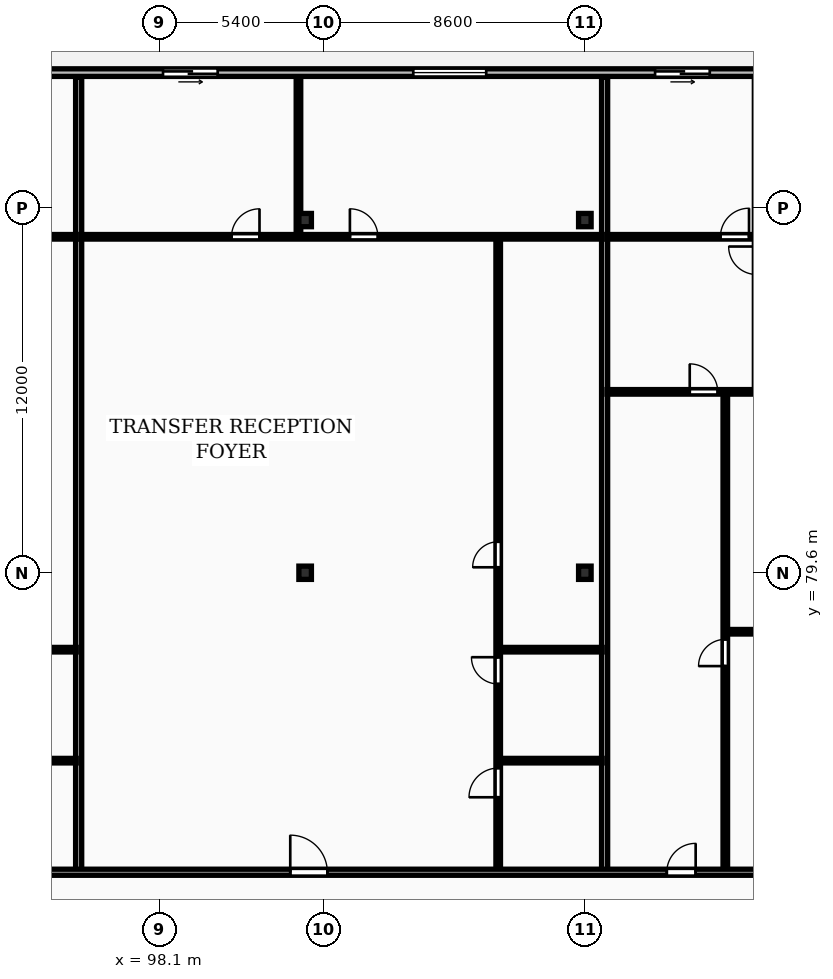
"""IFC4 building model, lengths in metres.
Left out: names, types, materials, properties, quantities, classifications, styles, units other than length and angle.
Written with IfcOpenShell. Run it as: python <this file> out.ifc"""

import sys

from ifc_helpers import new_model, si_unit, direction, frame, frame_2d, origin, origin_2d, place, context, subcontext, project, spatial, rectangle, i_section, extrude, element, fill, save


model = new_model("IFC4")
c1 = context("Model", 3, precision=1e-05, world=origin(), true_north=direction((0.0, 1.0)))
c2 = subcontext(c1, "Body", "Model", "MODEL_VIEW")
j1 = project(units=[si_unit("LENGTHUNIT", "METRE"), si_unit("PLANEANGLEUNIT", "RADIAN")], contexts=[c1])
p1 = place(None, origin())
s1 = spatial("IfcSite", under=j1, at=p1, CompositionType="ELEMENT")
p2 = place(p1, origin())
s2 = spatial("IfcBuilding", under=s1, at=p2, CompositionType="ELEMENT")
p3 = place(p2, frame((0.0, 0.0, 153.7)))
s3 = spatial("IfcBuildingStorey", under=s2, at=p3, CompositionType="ELEMENT", Elevation=153.7)
for number, where, z_axis, x_axis in (
    (1, (102.9, 79.6, 0.0), (0.0, 0.0, 1.0), (1.0, 0.0, 0.0)),
    (2, (102.9, 91.2, 0.0), (0.0, 0.0, 1.0), (1.0, 0.0, 0.0)),
    (3, (112.1, 79.6, 0.0), (0.0, 0.0, 1.0), (1.0, 0.0, 0.0)),
    (4, (112.1, 91.2, 0.0), (0.0, 0.0, 1.0), (1.0, 0.0, 0.0)),
):
    element("IfcColumn", number, at=place(p3, frame(where, z_axis=z_axis, x_axis=x_axis)), inside=s3, PredefinedType="COLUMN", context=c2, shape_type="SweptSolid", body=[
        extrude(i_section(OverallWidth=0.412, OverallDepth=0.437, WebThickness=0.036, FlangeThickness=0.052, FilletRadius=0.015, at=origin_2d()), origin(), (0.0, 0.0, 1.0), 3.6),
    ])
p4 = place(p3, frame((130.6, 96.05, 0.0), z_axis=(0.0, 0.0, 1.0), x_axis=(-1.0, 0.0, 0.0)))
e5 = element("IfcWall", 5, at=p4, inside=s3, PredefinedType="STANDARD", context=c2, shape_type="SweptSolid", body=[
    extrude(rectangle(XDim=73.0, YDim=0.25, at=frame_2d((36.5, 0.0))), origin(), (0.0, 0.0, 1.0), 3.32),
])
p5 = place(p4, frame((68.197, 0.0, 0.0)))
e6 = element("IfcOpeningElement", 6, at=p5, cuts=e5, PredefinedType="OPENING", context=c2, shape_type="SweptSolid", body=[
    extrude(rectangle(XDim=1.8, YDim=2.2, at=frame_2d((0.9, 1.1))), frame((0.0, 0.135, 0.0), z_axis=(0.0, -1.0, 0.0), x_axis=(1.0, 0.0, 0.0)), (0.0, 0.0, 1.0), 0.27),
])
p6 = place(p4, frame((58.911, 0.0, 0.85)))
e7 = element("IfcOpeningElement", 7, at=p6, cuts=e5, PredefinedType="OPENING", context=c2, shape_type="SweptSolid", body=[
    extrude(rectangle(XDim=2.4, YDim=1.9, at=frame_2d((1.2, 0.95))), frame((0.0, 0.135, 0.0), z_axis=(0.0, -1.0, 0.0), x_axis=(1.0, 0.0, 0.0)), (0.0, 0.0, 1.0), 0.27),
])
p7 = place(p4, frame((49.571, 0.0, 0.0)))
e8 = element("IfcOpeningElement", 8, at=p7, cuts=e5, PredefinedType="OPENING", context=c2, shape_type="SweptSolid", body=[
    extrude(rectangle(XDim=1.8, YDim=2.2, at=frame_2d((0.9, 1.1))), frame((0.0, 0.135, 0.0), z_axis=(0.0, -1.0, 0.0), x_axis=(1.0, 0.0, 0.0)), (0.0, 0.0, 1.0), 0.27),
])
p8 = place(p4, frame((39.572, 0.0, 0.85)))
e9 = element("IfcOpeningElement", 9, at=p8, cuts=e5, PredefinedType="OPENING", context=c2, shape_type="SweptSolid", body=[
    extrude(rectangle(XDim=2.4, YDim=1.9, at=frame_2d((1.2, 0.95))), frame((0.0, 0.135, 0.0), z_axis=(0.0, -1.0, 0.0), x_axis=(1.0, 0.0, 0.0)), (0.0, 0.0, 1.0), 0.27),
])
p9 = place(p4, frame((30.575, 0.0, 0.0)))
e10 = element("IfcOpeningElement", 10, at=p9, cuts=e5, PredefinedType="OPENING", context=c2, shape_type="SweptSolid", body=[
    extrude(rectangle(XDim=1.8, YDim=2.2, at=frame_2d((0.9, 1.1))), frame((0.0, 0.135, 0.0), z_axis=(0.0, -1.0, 0.0), x_axis=(1.0, 0.0, 0.0)), (0.0, 0.0, 1.0), 0.27),
])
p10 = place(p4, frame((21.745, 0.0, 0.85)))
e11 = element("IfcOpeningElement", 11, at=p10, cuts=e5, PredefinedType="OPENING", context=c2, shape_type="SweptSolid", body=[
    extrude(rectangle(XDim=2.4, YDim=1.9, at=frame_2d((1.2, 0.95))), frame((0.0, 0.135, 0.0), z_axis=(0.0, -1.0, 0.0), x_axis=(1.0, 0.0, 0.0)), (0.0, 0.0, 1.0), 0.27),
])
p11 = place(p4, frame((9.435, 0.0, 0.85)))
e12 = element("IfcOpeningElement", 12, at=p11, cuts=e5, PredefinedType="OPENING", context=c2, shape_type="SweptSolid", body=[
    extrude(rectangle(XDim=2.4, YDim=1.9, at=frame_2d((1.2, 0.95))), frame((0.0, 0.135, 0.0), z_axis=(0.0, -1.0, 0.0), x_axis=(1.0, 0.0, 0.0)), (0.0, 0.0, 1.0), 0.27),
])
p12 = place(p4, frame((5.695, 0.0, 0.85)))
e13 = element("IfcOpeningElement", 13, at=p12, cuts=e5, PredefinedType="OPENING", context=c2, shape_type="SweptSolid", body=[
    extrude(rectangle(XDim=1.8, YDim=1.8, at=frame_2d((0.9, 0.9))), frame((0.0, 0.135, 0.0), z_axis=(0.0, -1.0, 0.0), x_axis=(1.0, 0.0, 0.0)), (0.0, 0.0, 1.0), 0.27),
])
p13 = place(p4, frame((14.39, 0.0, 0.0)))
e14 = element("IfcOpeningElement", 14, at=p13, cuts=e5, PredefinedType="OPENING", context=c2, shape_type="SweptSolid", body=[
    extrude(rectangle(XDim=1.8, YDim=2.2, at=frame_2d((0.9, 1.1))), frame((0.0, 0.135, 0.0), z_axis=(0.0, -1.0, 0.0), x_axis=(1.0, 0.0, 0.0)), (0.0, 0.0, 1.0), 0.27),
])
p14 = place(p4, frame((1.245, 0.0, 0.85)))
e15 = element("IfcOpeningElement", 15, at=p14, cuts=e5, PredefinedType="OPENING", context=c2, shape_type="SweptSolid", body=[
    extrude(rectangle(XDim=2.4, YDim=1.9, at=frame_2d((1.2, 0.95))), frame((0.0, 0.135, 0.0), z_axis=(0.0, -1.0, 0.0), x_axis=(1.0, 0.0, 0.0)), (0.0, 0.0, 1.0), 0.27),
])
p15 = place(p3, frame((95.45, 69.83, 0.0), z_axis=(0.0, 0.0, 1.0), x_axis=(0.0, 1.0, 0.0)))
e16 = element("IfcWall", 16, at=p15, inside=s3, PredefinedType="PARTITIONING", context=c2, shape_type="SweptSolid", body=[
    extrude(rectangle(XDim=26.07, YDim=0.2, at=frame_2d((13.035, 0.0))), origin(), (0.0, 0.0, 1.0), 3.32),
])
for number, where, z_axis, x_axis in (
    (17, (92.24, 73.42, 0.0), (0.0, 0.0, 1.0), (1.0, 0.0, 0.0)),
    (18, (92.24, 77.07, 0.0), (0.0, 0.0, 1.0), (1.0, 0.0, 0.0)),
):
    element("IfcWall", number, at=place(p3, frame(where, z_axis=z_axis, x_axis=x_axis)), inside=s3, PredefinedType="PARTITIONING", context=c2, shape_type="SweptSolid", body=[
        extrude(rectangle(XDim=3.13, YDim=0.15, at=frame_2d((1.565, 0.0))), origin(), (0.0, 0.0, 1.0), 3.32),
    ])
p16 = place(p3, frame((75.893, 90.65, 0.0), z_axis=(0.0, 0.0, 1.0), x_axis=(1.0, 0.0, 0.0)))
e19 = element("IfcWall", 19, at=p16, inside=s3, PredefinedType="PARTITIONING", context=c2, shape_type="SweptSolid", body=[
    extrude(rectangle(XDim=19.478, YDim=0.15, at=frame_2d((9.739, 0.0))), origin(), (0.0, 0.0, 1.0), 3.32),
])
p17 = place(p16, frame((6.265, 0.0, 0.0)))
e20 = element("IfcOpeningElement", 20, at=p17, cuts=e19, PredefinedType="OPENING", context=c2, shape_type="SweptSolid", body=[
    extrude(rectangle(XDim=0.94, YDim=2.1, at=frame_2d((0.47, 1.05))), frame((0.0, 0.085, 0.0), z_axis=(0.0, -1.0, 0.0), x_axis=(1.0, 0.0, 0.0)), (0.0, 0.0, 1.0), 0.17),
])
p18 = place(p16, frame((10.095, 0.0, 0.0)))
e21 = element("IfcOpeningElement", 21, at=p18, cuts=e19, PredefinedType="OPENING", context=c2, shape_type="SweptSolid", body=[
    extrude(rectangle(XDim=0.94, YDim=2.1, at=frame_2d((0.47, 1.05))), frame((0.0, 0.085, 0.0), z_axis=(0.0, -1.0, 0.0), x_axis=(1.0, 0.0, 0.0)), (0.0, 0.0, 1.0), 0.17),
])
p19 = place(p3, frame((112.75, 69.83, 0.0), z_axis=(0.0, 0.0, 1.0), x_axis=(0.0, 1.0, 0.0)))
e22 = element("IfcWall", 22, at=p19, inside=s3, PredefinedType="PARTITIONING", context=c2, shape_type="SweptSolid", body=[
    extrude(rectangle(XDim=26.07, YDim=0.2, at=frame_2d((13.035, 0.0))), origin(), (0.0, 0.0, 1.0), 3.32),
])
for number, where, z_axis, x_axis in (
    (23, (109.31, 73.42, 0.0), (0.0, 0.0, 1.0), (1.0, 0.0, 0.0)),
    (24, (109.31, 77.07, 0.0), (0.0, 0.0, 1.0), (1.0, 0.0, 0.0)),
):
    element("IfcWall", number, at=place(p3, frame(where, z_axis=z_axis, x_axis=x_axis)), inside=s3, PredefinedType="PARTITIONING", context=c2, shape_type="SweptSolid", body=[
        extrude(rectangle(XDim=3.36, YDim=0.15, at=frame_2d((1.68, 0.0))), origin(), (0.0, 0.0, 1.0), 3.32),
    ])
p20 = place(p3, frame((109.25, 69.81, 0.0), z_axis=(0.0, 0.0, 1.0), x_axis=(0.0, 1.0, 0.0)))
e25 = element("IfcWall", 25, at=p20, inside=s3, PredefinedType="PARTITIONING", context=c2, shape_type="SweptSolid", body=[
    extrude(rectangle(XDim=20.78, YDim=0.15, at=frame_2d((10.39, 0.0))), origin(), (0.0, 0.0, 1.0), 3.32),
])
p21 = place(p20, frame((2.406, 0.0, 0.0)))
e26 = element("IfcOpeningElement", 26, at=p21, cuts=e25, PredefinedType="OPENING", context=c2, shape_type="SweptSolid", body=[
    extrude(rectangle(XDim=0.96, YDim=2.1, at=frame_2d((0.48, 1.05))), frame((0.0, 0.085, 0.0), z_axis=(0.0, -1.0, 0.0), x_axis=(1.0, 0.0, 0.0)), (0.0, 0.0, 1.0), 0.17),
])
p22 = place(p20, frame((6.133, 0.0, 0.0)))
e27 = element("IfcOpeningElement", 27, at=p22, cuts=e25, PredefinedType="OPENING", context=c2, shape_type="SweptSolid", body=[
    extrude(rectangle(XDim=0.88, YDim=2.06, at=frame_2d((0.44, 1.03))), frame((0.0, 0.085, 0.0), z_axis=(0.0, -1.0, 0.0), x_axis=(1.0, 0.0, 0.0)), (0.0, 0.0, 1.0), 0.17),
])
p23 = place(p20, frame((9.97, 0.0, 0.0)))
e28 = element("IfcOpeningElement", 28, at=p23, cuts=e25, PredefinedType="OPENING", context=c2, shape_type="SweptSolid", body=[
    extrude(rectangle(XDim=0.84, YDim=2.04, at=frame_2d((0.42, 1.02))), frame((0.0, 0.085, 0.0), z_axis=(0.0, -1.0, 0.0), x_axis=(1.0, 0.0, 0.0)), (0.0, 0.0, 1.0), 0.17),
])
p24 = place(p3, frame((102.68, 90.73, 0.0), z_axis=(0.0, 0.0, 1.0), x_axis=(0.0, 1.0, 0.0)))
e29 = element("IfcWall", 29, at=p24, inside=s3, PredefinedType="PARTITIONING", context=c2, shape_type="SweptSolid", body=[
    extrude(rectangle(XDim=5.17, YDim=0.15, at=frame_2d((2.585, 0.0))), origin(), (0.0, 0.0, 1.0), 2.627),
])
p25 = place(p3, frame((95.53, 90.65, 0.0), z_axis=(0.0, 0.0, 1.0), x_axis=(1.0, 0.0, 0.0)))
e30 = element("IfcWall", 30, at=p25, inside=s3, PredefinedType="PARTITIONING", context=c2, shape_type="SweptSolid", body=[
    extrude(rectangle(XDim=17.14, YDim=0.15, at=frame_2d((8.57, 0.0))), origin(), (0.0, 0.0, 1.0), 3.32),
])
p26 = place(p25, frame((4.948, 0.0, 0.0)))
e31 = element("IfcOpeningElement", 31, at=p26, cuts=e30, PredefinedType="OPENING", context=c2, shape_type="SweptSolid", body=[
    extrude(rectangle(XDim=0.92, YDim=2.08, at=frame_2d((0.46, 1.04))), frame((0.0, 0.085, 0.0), z_axis=(0.0, -1.0, 0.0), x_axis=(1.0, 0.0, 0.0)), (0.0, 0.0, 1.0), 0.17),
])
p27 = place(p25, frame((8.842, 0.0, 0.0)))
e32 = element("IfcOpeningElement", 32, at=p27, cuts=e30, PredefinedType="OPENING", context=c2, shape_type="SweptSolid", body=[
    extrude(rectangle(XDim=0.92, YDim=2.08, at=frame_2d((0.46, 1.04))), frame((0.0, 0.085, 0.0), z_axis=(0.0, -1.0, 0.0), x_axis=(1.0, 0.0, 0.0)), (0.0, 0.0, 1.0), 0.17),
])
p28 = place(p3, frame((116.78, 77.66, 0.0), z_axis=(0.0, 0.0, 1.0), x_axis=(1.0, 0.0, 0.0)))
e33 = element("IfcWall", 33, at=p28, inside=s3, PredefinedType="PARTITIONING", context=c2, shape_type="SweptSolid", body=[
    extrude(rectangle(XDim=13.74, YDim=0.15, at=frame_2d((6.87, 0.0))), origin(), (0.0, 0.0, 1.0), 3.32),
])
p29 = place(p28, frame((5.65, 0.0, 0.0)))
e34 = element("IfcOpeningElement", 34, at=p29, cuts=e33, PredefinedType="OPENING", context=c2, shape_type="SweptSolid", body=[
    extrude(rectangle(XDim=0.88, YDim=2.06, at=frame_2d((0.44, 1.03))), frame((0.0, 0.085, 0.0), z_axis=(0.0, -1.0, 0.0), x_axis=(1.0, 0.0, 0.0)), (0.0, 0.0, 1.0), 0.17),
])
p30 = place(p3, frame((116.72, 69.81, 0.0), z_axis=(0.0, 0.0, 1.0), x_axis=(0.0, 1.0, 0.0)))
e35 = element("IfcWall", 35, at=p30, inside=s3, PredefinedType="PARTITIONING", context=c2, shape_type="SweptSolid", body=[
    extrude(rectangle(XDim=15.7, YDim=0.15, at=frame_2d((7.85, 0.0))), origin(), (0.0, 0.0, 1.0), 3.32),
])
p31 = place(p30, frame((6.72, 0.0, 0.0)))
e36 = element("IfcOpeningElement", 36, at=p31, cuts=e35, PredefinedType="OPENING", context=c2, shape_type="SweptSolid", body=[
    extrude(rectangle(XDim=0.88, YDim=2.06, at=frame_2d((0.44, 1.03))), frame((0.0, 0.085, 0.0), z_axis=(0.0, -1.0, 0.0), x_axis=(1.0, 0.0, 0.0)), (0.0, 0.0, 1.0), 0.17),
])
p32 = place(p3, frame((112.83, 85.55, 0.0), z_axis=(0.0, 0.0, 1.0), x_axis=(1.0, 0.0, 0.0)))
e37 = element("IfcWall", 37, at=p32, inside=s3, PredefinedType="PARTITIONING", context=c2, shape_type="SweptSolid", body=[
    extrude(rectangle(XDim=17.69, YDim=0.15, at=frame_2d((8.845, 0.0))), origin(), (0.0, 0.0, 1.0), 3.32),
])
p33 = place(p32, frame((2.72, 0.0, 0.0)))
e38 = element("IfcOpeningElement", 38, at=p33, cuts=e37, PredefinedType="OPENING", context=c2, shape_type="SweptSolid", body=[
    extrude(rectangle(XDim=0.92, YDim=2.08, at=frame_2d((0.46, 1.04))), frame((0.0, 0.085, 0.0), z_axis=(0.0, -1.0, 0.0), x_axis=(1.0, 0.0, 0.0)), (0.0, 0.0, 1.0), 0.17),
])
p34 = place(p3, frame((112.83, 90.65, 0.0), z_axis=(0.0, 0.0, 1.0), x_axis=(1.0, 0.0, 0.0)))
e39 = element("IfcWall", 39, at=p34, inside=s3, PredefinedType="PARTITIONING", context=c2, shape_type="SweptSolid", body=[
    extrude(rectangle(XDim=13.0, YDim=0.15, at=frame_2d((6.5, 0.0))), origin(), (0.0, 0.0, 1.0), 3.32),
])
p35 = place(p34, frame((3.73, 0.0, 0.0)))
e40 = element("IfcOpeningElement", 40, at=p35, cuts=e39, PredefinedType="OPENING", context=c2, shape_type="SweptSolid", body=[
    extrude(rectangle(XDim=0.94, YDim=2.1, at=frame_2d((0.47, 1.05))), frame((0.0, 0.085, 0.0), z_axis=(0.0, -1.0, 0.0), x_axis=(1.0, 0.0, 0.0)), (0.0, 0.0, 1.0), 0.17),
])
p36 = place(p34, frame((5.14, 0.0, 0.0)))
e41 = element("IfcOpeningElement", 41, at=p36, cuts=e39, PredefinedType="OPENING", context=c2, shape_type="SweptSolid", body=[
    extrude(rectangle(XDim=0.88, YDim=2.06, at=frame_2d((0.44, 1.03))), frame((0.0, 0.085, 0.0), z_axis=(0.0, -1.0, 0.0), x_axis=(1.0, 0.0, 0.0)), (0.0, 0.0, 1.0), 0.17),
])
p37 = place(p34, frame((9.617, 0.0, 0.0)))
e42 = element("IfcOpeningElement", 42, at=p37, cuts=e39, PredefinedType="OPENING", context=c2, shape_type="SweptSolid", body=[
    extrude(rectangle(XDim=0.88, YDim=2.06, at=frame_2d((0.44, 1.03))), frame((0.0, 0.085, 0.0), z_axis=(0.0, -1.0, 0.0), x_axis=(1.0, 0.0, 0.0)), (0.0, 0.0, 1.0), 0.17),
])
p38 = place(p3, frame((57.6, 69.75, 0.0), z_axis=(0.0, 0.0, 1.0), x_axis=(1.0, 0.0, 0.0)))
e43 = element("IfcWall", 43, at=p38, inside=s3, PredefinedType="PARTITIONING", context=c2, shape_type="SweptSolid", body=[
    extrude(rectangle(XDim=73.0, YDim=0.2, at=frame_2d((36.5, 0.0))), origin(), (0.0, 0.0, 1.0), 3.32),
])
p39 = place(p38, frame((7.416, 0.0, 0.0)))
e44 = element("IfcOpeningElement", 44, at=p39, cuts=e43, PredefinedType="OPENING", context=c2, shape_type="SweptSolid", body=[
    extrude(rectangle(XDim=1.22, YDim=2.18, at=frame_2d((0.61, 1.09))), frame((0.0, 0.11, 0.0), z_axis=(0.0, -1.0, 0.0), x_axis=(1.0, 0.0, 0.0)), (0.0, 0.0, 1.0), 0.22),
])
p40 = place(p38, frame((26.456, 0.0, 0.0)))
e45 = element("IfcOpeningElement", 45, at=p40, cuts=e43, PredefinedType="OPENING", context=c2, shape_type="SweptSolid", body=[
    extrude(rectangle(XDim=1.22, YDim=2.18, at=frame_2d((0.61, 1.09))), frame((0.0, 0.11, 0.0), z_axis=(0.0, -1.0, 0.0), x_axis=(1.0, 0.0, 0.0)), (0.0, 0.0, 1.0), 0.22),
])
p41 = place(p38, frame((44.81, 0.0, 0.0)))
e46 = element("IfcOpeningElement", 46, at=p41, cuts=e43, PredefinedType="OPENING", context=c2, shape_type="SweptSolid", body=[
    extrude(rectangle(XDim=1.22, YDim=2.18, at=frame_2d((0.61, 1.09))), frame((0.0, 0.11, 0.0), z_axis=(0.0, -1.0, 0.0), x_axis=(1.0, 0.0, 0.0)), (0.0, 0.0, 1.0), 0.22),
])
p42 = place(p38, frame((57.195, 0.0, 0.0)))
e47 = element("IfcOpeningElement", 47, at=p42, cuts=e43, PredefinedType="OPENING", context=c2, shape_type="SweptSolid", body=[
    extrude(rectangle(XDim=0.95, YDim=2.15, at=frame_2d((0.475, 1.075))), frame((0.0, 0.11, 0.0), z_axis=(0.0, -1.0, 0.0), x_axis=(1.0, 0.0, 0.0)), (0.0, 0.0, 1.0), 0.22),
])
p43 = place(p9, origin())
e48 = element("IfcDoor", 48, at=p43, inside=s3, OperationType="SLIDING_TO_LEFT", PredefinedType="DOOR", context=c2, shape_type="SweptSolid", body=[
    extrude(rectangle(XDim=1.8, YDim=2.2, at=frame_2d((0.9, 1.1))), frame((0.0, 0.025, 0.0), z_axis=(0.0, -1.0, 0.0), x_axis=(1.0, 0.0, 0.0)), (0.0, 0.0, 1.0), 0.05),
])
fill(e10, e48)
p44 = place(p10, origin())
e49 = element("IfcWindow", 49, at=p44, inside=s3, PartitioningType="DOUBLE_PANEL_VERTICAL", PredefinedType="WINDOW", context=c2, shape_type="SweptSolid", body=[
    extrude(rectangle(XDim=2.4, YDim=1.9, at=frame_2d((1.2, 0.95))), frame((0.0, 0.03, 0.0), z_axis=(0.0, -1.0, 0.0), x_axis=(1.0, 0.0, 0.0)), (0.0, 0.0, 1.0), 0.06),
])
fill(e11, e49)
p45 = place(p13, origin())
e50 = element("IfcDoor", 50, at=p45, inside=s3, OperationType="SLIDING_TO_LEFT", PredefinedType="DOOR", context=c2, shape_type="SweptSolid", body=[
    extrude(rectangle(XDim=1.8, YDim=2.2, at=frame_2d((0.9, 1.1))), frame((0.0, 0.025, 0.0), z_axis=(0.0, -1.0, 0.0), x_axis=(1.0, 0.0, 0.0)), (0.0, 0.0, 1.0), 0.05),
])
fill(e14, e50)
p46 = place(p21, origin())
e51 = element("IfcDoor", 51, at=p46, inside=s3, OperationType="SINGLE_SWING_LEFT", PredefinedType="DOOR", context=c2, shape_type="SweptSolid", body=[
    extrude(rectangle(XDim=0.96, YDim=2.1, at=frame_2d((0.48, 1.05))), frame((0.0, 0.025, 0.0), z_axis=(0.0, -1.0, 0.0), x_axis=(1.0, 0.0, 0.0)), (0.0, 0.0, 1.0), 0.05),
])
fill(e26, e51)
p47 = place(p22, origin())
e52 = element("IfcDoor", 52, at=p47, inside=s3, OperationType="SINGLE_SWING_RIGHT", PredefinedType="DOOR", context=c2, shape_type="SweptSolid", body=[
    extrude(rectangle(XDim=0.88, YDim=2.06, at=frame_2d((0.44, 1.03))), frame((0.0, 0.025, 0.0), z_axis=(0.0, -1.0, 0.0), x_axis=(1.0, 0.0, 0.0)), (0.0, 0.0, 1.0), 0.05),
])
fill(e27, e52)
p48 = place(p23, origin())
e53 = element("IfcDoor", 53, at=p48, inside=s3, OperationType="SINGLE_SWING_LEFT", PredefinedType="DOOR", context=c2, shape_type="SweptSolid", body=[
    extrude(rectangle(XDim=0.84, YDim=2.04, at=frame_2d((0.42, 1.02))), frame((0.0, 0.025, 0.0), z_axis=(0.0, -1.0, 0.0), x_axis=(1.0, 0.0, 0.0)), (0.0, 0.0, 1.0), 0.05),
])
fill(e28, e53)
p49 = place(p26, origin())
e54 = element("IfcDoor", 54, at=p49, inside=s3, OperationType="SINGLE_SWING_RIGHT", PredefinedType="DOOR", context=c2, shape_type="SweptSolid", body=[
    extrude(rectangle(XDim=0.92, YDim=2.08, at=frame_2d((0.46, 1.04))), frame((0.0, 0.025, 0.0), z_axis=(0.0, -1.0, 0.0), x_axis=(1.0, 0.0, 0.0)), (0.0, 0.0, 1.0), 0.05),
])
fill(e31, e54)
p50 = place(p27, origin())
e55 = element("IfcDoor", 55, at=p50, inside=s3, OperationType="SINGLE_SWING_LEFT", PredefinedType="DOOR", context=c2, shape_type="SweptSolid", body=[
    extrude(rectangle(XDim=0.92, YDim=2.08, at=frame_2d((0.46, 1.04))), frame((0.0, 0.025, 0.0), z_axis=(0.0, -1.0, 0.0), x_axis=(1.0, 0.0, 0.0)), (0.0, 0.0, 1.0), 0.05),
])
fill(e32, e55)
p51 = place(p31, origin())
e56 = element("IfcDoor", 56, at=p51, inside=s3, OperationType="SINGLE_SWING_LEFT", PredefinedType="DOOR", context=c2, shape_type="SweptSolid", body=[
    extrude(rectangle(XDim=0.88, YDim=2.06, at=frame_2d((0.44, 1.03))), frame((0.0, 0.025, 0.0), z_axis=(0.0, -1.0, 0.0), x_axis=(1.0, 0.0, 0.0)), (0.0, 0.0, 1.0), 0.05),
])
fill(e36, e56)
p52 = place(p33, origin())
e57 = element("IfcDoor", 57, at=p52, inside=s3, OperationType="SINGLE_SWING_LEFT", PredefinedType="DOOR", context=c2, shape_type="SweptSolid", body=[
    extrude(rectangle(XDim=0.92, YDim=2.08, at=frame_2d((0.46, 1.04))), frame((0.0, 0.025, 0.0), z_axis=(0.0, -1.0, 0.0), x_axis=(1.0, 0.0, 0.0)), (0.0, 0.0, 1.0), 0.05),
])
fill(e38, e57)
p53 = place(p35, origin())
e58 = element("IfcDoor", 58, at=p53, inside=s3, OperationType="SINGLE_SWING_RIGHT", PredefinedType="DOOR", context=c2, shape_type="SweptSolid", body=[
    extrude(rectangle(XDim=0.94, YDim=2.1, at=frame_2d((0.47, 1.05))), frame((0.0, 0.025, 0.0), z_axis=(0.0, -1.0, 0.0), x_axis=(1.0, 0.0, 0.0)), (0.0, 0.0, 1.0), 0.05),
])
fill(e40, e58)
p54 = place(p41, origin())
e59 = element("IfcDoor", 59, at=p54, inside=s3, OperationType="SINGLE_SWING_LEFT", PredefinedType="DOOR", context=c2, shape_type="SweptSolid", body=[
    extrude(rectangle(XDim=1.22, YDim=2.18, at=frame_2d((0.61, 1.09))), frame((0.0, 0.025, 0.0), z_axis=(0.0, -1.0, 0.0), x_axis=(1.0, 0.0, 0.0)), (0.0, 0.0, 1.0), 0.05),
])
fill(e46, e59)
p55 = place(p42, origin())
e60 = element("IfcDoor", 60, at=p55, inside=s3, OperationType="SINGLE_SWING_RIGHT", PredefinedType="DOOR", context=c2, shape_type="SweptSolid", body=[
    extrude(rectangle(XDim=0.95, YDim=2.15, at=frame_2d((0.475, 1.075))), frame((0.0, 0.025, 0.0), z_axis=(0.0, -1.0, 0.0), x_axis=(1.0, 0.0, 0.0)), (0.0, 0.0, 1.0), 0.05),
])
fill(e47, e60)
save(model, sys.argv[1])
